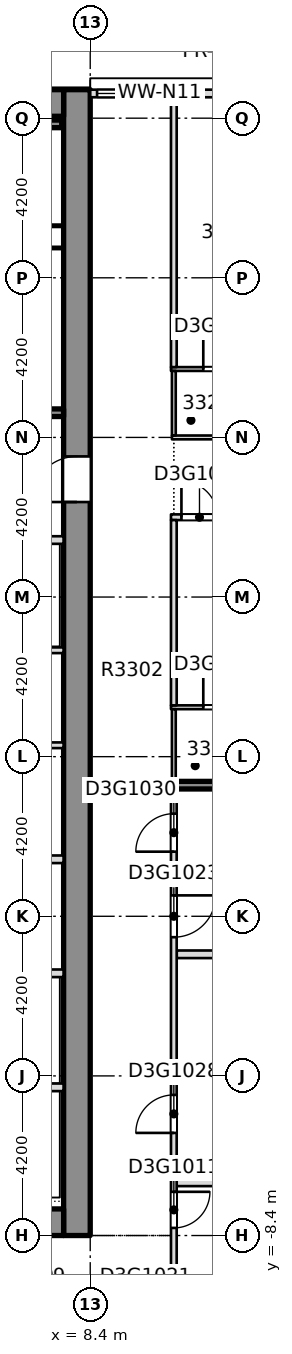
"""IFC4 building model, lengths in metres.
Left out: names, types, materials, properties, quantities, classifications, styles, units other than length and angle.
Written with IfcOpenShell. Run it as: python <this file> out.ifc"""

import sys

from ifc_helpers import new_model, si_unit, direction, frame, frame_2d, origin, place, context, subcontext, project, spatial, rectangle, extrude, element, fill, save


model = new_model("IFC4")
c1 = context("Model", 3, precision=1e-05, world=origin(), true_north=direction((0.0, 1.0)))
c2 = subcontext(c1, "Body", "Model", "MODEL_VIEW")
j1 = project(units=[si_unit("LENGTHUNIT", "METRE"), si_unit("PLANEANGLEUNIT", "RADIAN")], contexts=[c1])
p1 = place(None, origin())
s1 = spatial("IfcSite", under=j1, at=p1, CompositionType="ELEMENT")
p2 = place(p1, origin())
s2 = spatial("IfcBuilding", under=s1, at=p2, CompositionType="ELEMENT")
p3 = place(p2, frame((0.0, 0.0, 133.1)))
s3 = spatial("IfcBuildingStorey", under=s2, at=p3, CompositionType="ELEMENT", Elevation=133.1)
p4 = place(p3, frame((8.05, -8.4, -0.4), z_axis=(0.0, 0.0, 1.0), x_axis=(0.0, 1.0, 0.0)))
e1 = element("IfcWall", 1, at=p4, inside=s3, PredefinedType="SOLIDWALL", context=c2, shape_type="SweptSolid", body=[
    extrude(rectangle(XDim=30.15, YDim=0.7, at=frame_2d((15.075, 0.0))), origin(), (0.0, 0.0, 1.0), 3.45),
])
p5 = place(p4, frame((19.3, 0.0, 0.4)))
e2 = element("IfcOpeningElement", 2, at=p5, cuts=e1, PredefinedType="OPENING", context=c2, shape_type="SweptSolid", body=[
    extrude(rectangle(XDim=1.2, YDim=2.1, at=frame_2d((0.6, 1.05))), frame((0.0, 0.36, 0.0), z_axis=(0.0, -1.0, 0.0), x_axis=(1.0, 0.0, 0.0)), (0.0, 0.0, 1.0), 0.72),
])
p6 = place(p3, frame((-7.7, -8.05, -0.4), z_axis=(0.0, 0.0, 1.0), x_axis=(1.0, 0.0, 0.0)))
e3 = element("IfcWall", 3, at=p6, inside=s3, PredefinedType="SHEAR", context=c2, shape_type="SweptSolid", body=[
    extrude(rectangle(XDim=15.4, YDim=0.7, at=frame_2d((7.7, 0.0))), origin(), (0.0, 0.0, 1.0), 3.45),
])
p7 = place(p6, frame((2.95, 0.0, 0.4)))
e4 = element("IfcOpeningElement", 4, at=p7, cuts=e3, PredefinedType="OPENING", context=c2, shape_type="SweptSolid", body=[
    extrude(rectangle(XDim=1.8, YDim=2.1, at=frame_2d((0.9, 1.05))), frame((0.0, 0.36, 0.0), z_axis=(0.0, -1.0, 0.0), x_axis=(1.0, 0.0, 0.0)), (0.0, 0.0, 1.0), 0.72),
])
p8 = place(p6, frame((10.65, 0.0, 0.4)))
e5 = element("IfcOpeningElement", 5, at=p8, cuts=e3, PredefinedType="OPENING", context=c2, shape_type="SweptSolid", body=[
    extrude(rectangle(XDim=1.8, YDim=2.1, at=frame_2d((0.9, 1.05))), frame((0.0, 0.36, 0.0), z_axis=(0.0, -1.0, 0.0), x_axis=(1.0, 0.0, 0.0)), (0.0, 0.0, 1.0), 0.72),
])
p9 = place(p3, frame((-7.7, 21.4, -0.4), z_axis=(0.0, 0.0, 1.0), x_axis=(1.0, 0.0, 0.0)))
e6 = element("IfcWall", 6, at=p9, inside=s3, PredefinedType="SHEAR", context=c2, shape_type="SweptSolid", body=[
    extrude(rectangle(XDim=15.4, YDim=0.7, at=frame_2d((7.7, 0.0))), origin(), (0.0, 0.0, 1.0), 3.45),
])
p10 = place(p3, frame((10.675, -7.0, 0.0), z_axis=(0.0, 0.0, 1.0), x_axis=(1.0, 0.0, 0.0)))
e7 = element("IfcWall", 7, at=p10, inside=s3, PredefinedType="PARTITIONING", context=c2, shape_type="SweptSolid", body=[
    extrude(rectangle(XDim=10.875, YDim=0.2, at=frame_2d((5.438, 0.0))), origin(), (0.0, 0.0, 1.0), 3.05),
])
p11 = place(p3, frame((10.677, -1.0, 0.0), z_axis=(0.0, 0.0, 1.0), x_axis=(1.0, 0.0, 0.0)))
e8 = element("IfcWall", 8, at=p11, inside=s3, PredefinedType="PARTITIONING", context=c2, shape_type="SweptSolid", body=[
    extrude(rectangle(XDim=6.071, YDim=0.2, at=frame_2d((3.036, 0.0))), origin(), (0.0, 0.0, 1.0), 3.05),
])
p12 = place(p3, frame((10.675, 1.0, 0.0), z_axis=(0.0, 0.0, 1.0), x_axis=(1.0, 0.0, 0.0)))
e9 = element("IfcWall", 9, at=p12, inside=s3, PredefinedType="PARTITIONING", context=c2, shape_type="SweptSolid", body=[
    extrude(rectangle(XDim=6.075, YDim=0.2, at=frame_2d((3.038, 0.0))), origin(), (0.0, 0.0, 1.0), 3.05),
])
p13 = place(p3, frame((10.525, 3.45, 0.0), z_axis=(0.0, 0.0, 1.0), x_axis=(1.0, 0.0, 0.0)))
e10 = element("IfcWall", 10, at=p13, inside=s3, PredefinedType="SOLIDWALL", context=c2, shape_type="SweptSolid", body=[
    extrude(rectangle(XDim=2.525, YDim=0.2, at=frame_2d((1.263, 0.0))), origin(), (0.0, 0.0, 1.0), 3.05),
])
p14 = place(p3, frame((10.525, 5.5, 0.0), z_axis=(0.0, 0.0, 1.0), x_axis=(1.0, 0.0, 0.0)))
e11 = element("IfcWall", 11, at=p14, inside=s3, PredefinedType="PARTITIONING", context=c2, shape_type="SweptSolid", body=[
    extrude(rectangle(XDim=2.525, YDim=0.1, at=frame_2d((1.263, 0.0))), origin(), (0.0, 0.0, 1.0), 3.05),
])
p15 = place(p14, frame((0.85, 0.0, 0.0)))
e12 = element("IfcOpeningElement", 12, at=p15, cuts=e11, PredefinedType="OPENING", context=c2, shape_type="SweptSolid", body=[
    extrude(rectangle(XDim=0.85, YDim=2.1, at=frame_2d((0.425, 1.05))), frame((0.0, 0.06, 0.0), z_axis=(0.0, -1.0, 0.0), x_axis=(1.0, 0.0, 0.0)), (0.0, 0.0, 1.0), 0.12),
])
p16 = place(p3, frame((10.525, 10.5, 0.0), z_axis=(0.0, 0.0, 1.0), x_axis=(1.0, 0.0, 0.0)))
e13 = element("IfcWall", 13, at=p16, inside=s3, PredefinedType="PARTITIONING", context=c2, shape_type="SweptSolid", body=[
    extrude(rectangle(XDim=11.025, YDim=0.15, at=frame_2d((5.513, 0.0))), origin(), (0.0, 0.0, 1.0), 3.05),
])
p17 = place(p16, frame((0.275, 0.0, 0.0)))
e14 = element("IfcOpeningElement", 14, at=p17, cuts=e13, PredefinedType="OPENING", context=c2, shape_type="SweptSolid", body=[
    extrude(rectangle(XDim=0.95, YDim=2.1, at=frame_2d((0.475, 1.05))), frame((0.0, 0.085, 0.0), z_axis=(0.0, -1.0, 0.0), x_axis=(1.0, 0.0, 0.0)), (0.0, 0.0, 1.0), 0.17),
])
p18 = place(p3, frame((10.55, 12.6, 0.0), z_axis=(0.0, 0.0, 1.0), x_axis=(1.0, 0.0, 0.0)))
e15 = element("IfcWall", 15, at=p18, inside=s3, PredefinedType="PARTITIONING", context=c2, shape_type="SweptSolid", body=[
    extrude(rectangle(XDim=2.5, YDim=0.1, at=frame_2d((1.25, 0.0))), origin(), (0.0, 0.0, 1.0), 3.05),
])
p19 = place(p3, frame((10.525, 14.4, 0.0), z_axis=(0.0, 0.0, 1.0), x_axis=(1.0, 0.0, 0.0)))
e16 = element("IfcWall", 16, at=p19, inside=s3, PredefinedType="PARTITIONING", context=c2, shape_type="SweptSolid", body=[
    extrude(rectangle(XDim=2.525, YDim=0.1, at=frame_2d((1.263, 0.0))), origin(), (0.0, 0.0, 1.0), 3.05),
])
p20 = place(p19, frame((0.85, 0.0, 0.0)))
e17 = element("IfcOpeningElement", 17, at=p20, cuts=e16, PredefinedType="OPENING", context=c2, shape_type="SweptSolid", body=[
    extrude(rectangle(XDim=0.85, YDim=2.1, at=frame_2d((0.425, 1.05))), frame((0.0, 0.06, 0.0), z_axis=(0.0, -1.0, 0.0), x_axis=(1.0, 0.0, 0.0)), (0.0, 0.0, 1.0), 0.12),
])
p21 = place(p3, frame((10.6, -10.29, 0.0), z_axis=(0.0, 0.0, 1.0), x_axis=(0.0, 1.0, 0.0)))
e18 = element("IfcWall", 18, at=p21, inside=s3, PredefinedType="PARTITIONING", context=c2, shape_type="SweptSolid", body=[
    extrude(rectangle(XDim=13.64, YDim=0.15, at=frame_2d((6.82, 0.0))), origin(), (0.0, 0.0, 1.0), 3.05),
])
p22 = place(p21, frame((2.09, 0.0, 0.0)))
e19 = element("IfcOpeningElement", 19, at=p22, cuts=e18, PredefinedType="OPENING", context=c2, shape_type="SweptSolid", body=[
    extrude(rectangle(XDim=0.95, YDim=2.1, at=frame_2d((0.475, 1.05))), frame((0.0, 0.085, 0.0), z_axis=(0.0, -1.0, 0.0), x_axis=(1.0, 0.0, 0.0)), (0.0, 0.0, 1.0), 0.17),
])
p23 = place(p21, frame((9.74, 0.0, 0.0)))
e20 = element("IfcOpeningElement", 20, at=p23, cuts=e18, PredefinedType="OPENING", context=c2, shape_type="SweptSolid", body=[
    extrude(rectangle(XDim=1.1, YDim=2.1, at=frame_2d((0.55, 1.05))), frame((0.0, 0.085, 0.0), z_axis=(0.0, -1.0, 0.0), x_axis=(1.0, 0.0, 0.0)), (0.0, 0.0, 1.0), 0.17),
])
p24 = place(p21, frame((4.59, 0.0, 0.0)))
e21 = element("IfcOpeningElement", 21, at=p24, cuts=e18, PredefinedType="OPENING", context=c2, shape_type="SweptSolid", body=[
    extrude(rectangle(XDim=1.0, YDim=2.1, at=frame_2d((0.5, 1.05))), frame((0.0, 0.085, 0.0), z_axis=(0.0, -1.0, 0.0), x_axis=(1.0, 0.0, 0.0)), (0.0, 0.0, 1.0), 0.17),
])
p25 = place(p21, frame((11.99, 0.0, 0.0)))
e22 = element("IfcOpeningElement", 22, at=p25, cuts=e18, PredefinedType="OPENING", context=c2, shape_type="SweptSolid", body=[
    extrude(rectangle(XDim=1.0, YDim=2.1, at=frame_2d((0.5, 1.05))), frame((0.0, 0.085, 0.0), z_axis=(0.0, -1.0, 0.0), x_axis=(1.0, 0.0, 0.0)), (0.0, 0.0, 1.0), 0.17),
])
p26 = place(p3, frame((10.6, 3.45, 0.0), z_axis=(0.0, 0.0, 1.0), x_axis=(0.0, 1.0, 0.0)))
e23 = element("IfcWall", 23, at=p26, inside=s3, PredefinedType="PARTITIONING", context=c2, shape_type="SweptSolid", body=[
    extrude(rectangle(XDim=2.0, YDim=0.1, at=frame_2d((1.0, 0.0))), origin(), (0.0, 0.0, 1.0), 3.05),
])
p27 = place(p3, frame((10.6, 5.55, 0.0), z_axis=(0.0, 0.0, 1.0), x_axis=(0.0, 1.0, 0.0)))
e24 = element("IfcWall", 24, at=p27, inside=s3, PredefinedType="PARTITIONING", context=c2, shape_type="SweptSolid", body=[
    extrude(rectangle(XDim=4.875, YDim=0.15, at=frame_2d((2.438, 0.0))), origin(), (0.0, 0.0, 1.0), 3.05),
])
p28 = place(p3, frame((10.6, 12.65, 0.0), z_axis=(0.0, 0.0, 1.0), x_axis=(0.0, 1.0, 0.0)))
e25 = element("IfcWall", 25, at=p28, inside=s3, PredefinedType="PARTITIONING", context=c2, shape_type="SweptSolid", body=[
    extrude(rectangle(XDim=1.7, YDim=0.1, at=frame_2d((0.85, 0.0))), origin(), (0.0, 0.0, 1.0), 3.05),
])
p29 = place(p3, frame((10.6, 14.45, 0.0), z_axis=(0.0, 0.0, 1.0), x_axis=(0.0, 1.0, 0.0)))
e26 = element("IfcWall", 26, at=p29, inside=s3, PredefinedType="PARTITIONING", context=c2, shape_type="SweptSolid", body=[
    extrude(rectangle(XDim=7.1, YDim=0.15, at=frame_2d((3.55, 0.0))), origin(), (0.0, 0.0, 1.0), 3.05),
])
p30 = place(p3, frame((12.05, 21.65, 0.0), z_axis=(0.0, 0.0, 1.0), x_axis=(-1.0, 0.0, 0.0)))
e27 = element("IfcWall", 27, at=p30, inside=s3, PredefinedType="STANDARD", context=c2, shape_type="SweptSolid", body=[
    extrude(rectangle(XDim=3.65, YDim=0.2, at=frame_2d((1.825, 0.0))), origin(), (0.0, 0.0, 1.0), 3.05),
])
p31 = place(p30, frame((1.67, 0.0, 0.2)))
e28 = element("IfcOpeningElement", 28, at=p31, cuts=e27, PredefinedType="OPENING", context=c2, shape_type="SweptSolid", body=[
    extrude(rectangle(XDim=1.8, YDim=2.65, at=frame_2d((0.9, 1.325))), frame((0.0, 0.11, 0.0), z_axis=(0.0, -1.0, 0.0), x_axis=(1.0, 0.0, 0.0)), (0.0, 0.0, 1.0), 0.22),
])
for number, where, z_axis, x_axis in (
    (29, (5.575, -4.5, 0.0), (0.0, 0.0, 1.0), (1.0, 0.0, 0.0)),
    (30, (5.575, -1.5, 0.0), (0.0, 0.0, 1.0), (1.0, 0.0, 0.0)),
    (31, (5.575, 1.5, 0.0), (0.0, 0.0, 1.0), (1.0, 0.0, 0.0)),
):
    element("IfcWall", number, at=place(p3, frame(where, z_axis=z_axis, x_axis=x_axis)), inside=s3, PredefinedType="PARTITIONING", context=c2, shape_type="SweptSolid", body=[
        extrude(rectangle(XDim=2.124, YDim=0.2, at=frame_2d((1.062, 0.0))), origin(), (0.0, 0.0, 1.0), 3.05),
    ])
p32 = place(p3, frame((5.425, 4.5, 0.0), z_axis=(0.0, 0.0, 1.0), x_axis=(1.0, 0.0, 0.0)))
e32 = element("IfcWall", 32, at=p32, inside=s3, PredefinedType="PARTITIONING", context=c2, shape_type="SweptSolid", body=[
    extrude(rectangle(XDim=2.274, YDim=0.15, at=frame_2d((1.137, 0.0))), origin(), (0.0, 0.0, 1.0), 3.05),
])
p33 = place(p3, frame((-7.699, 7.0, 0.0), z_axis=(0.0, 0.0, 1.0), x_axis=(1.0, 0.0, 0.0)))
e33 = element("IfcWall", 33, at=p33, inside=s3, PredefinedType="PARTITIONING", context=c2, shape_type="SweptSolid", body=[
    extrude(rectangle(XDim=15.398, YDim=0.15, at=frame_2d((7.699, 0.0))), origin(), (0.0, 0.0, 1.0), 3.05),
])
p34 = place(p33, frame((6.999, 0.0, 0.0)))
e34 = element("IfcOpeningElement", 34, at=p34, cuts=e33, PredefinedType="OPENING", context=c2, shape_type="SweptSolid", body=[
    extrude(rectangle(XDim=1.4, YDim=2.1, at=frame_2d((0.7, 1.05))), frame((0.0, 0.085, 0.0), z_axis=(0.0, -1.0, 0.0), x_axis=(1.0, 0.0, 0.0)), (0.0, 0.0, 1.0), 0.17),
])
p35 = place(p3, frame((3.6, 9.9, 0.0), z_axis=(0.0, 0.0, 1.0), x_axis=(1.0, 0.0, 0.0)))
e35 = element("IfcWall", 35, at=p35, inside=s3, PredefinedType="PARTITIONING", context=c2, shape_type="SweptSolid", body=[
    extrude(rectangle(XDim=4.099, YDim=0.2, at=frame_2d((2.049, 0.0))), origin(), (0.0, 0.0, 1.0), 3.05),
])
p36 = place(p35, frame((2.25, 0.0, 0.0)))
e36 = element("IfcOpeningElement", 36, at=p36, cuts=e35, PredefinedType="OPENING", context=c2, shape_type="SweptSolid", body=[
    extrude(rectangle(XDim=1.1, YDim=2.1, at=frame_2d((0.55, 1.05))), frame((0.0, 0.11, 0.0), z_axis=(0.0, -1.0, 0.0), x_axis=(1.0, 0.0, 0.0)), (0.0, 0.0, 1.0), 0.22),
])
p37 = place(p3, frame((3.425, 13.25, 0.0), z_axis=(0.0, 0.0, 1.0), x_axis=(1.0, 0.0, 0.0)))
e37 = element("IfcWall", 37, at=p37, inside=s3, PredefinedType="SOLIDWALL", context=c2, shape_type="SweptSolid", body=[
    extrude(rectangle(XDim=4.274, YDim=0.2, at=frame_2d((2.137, 0.0))), origin(), (0.0, 0.0, 1.0), 3.05),
])
p38 = place(p37, frame((1.825, 0.0, 0.0)))
e38 = element("IfcOpeningElement", 38, at=p38, cuts=e37, PredefinedType="OPENING", context=c2, shape_type="SweptSolid", body=[
    extrude(rectangle(XDim=1.2, YDim=2.1, at=frame_2d((0.6, 1.05))), frame((0.0, 0.11, 0.0), z_axis=(0.0, -1.0, 0.0), x_axis=(1.0, 0.0, 0.0)), (0.0, 0.0, 1.0), 0.22),
])
p39 = place(p3, frame((4.1, 20.85, 0.0), z_axis=(0.0, 0.0, 1.0), x_axis=(1.0, 0.0, 0.0)))
e39 = element("IfcWall", 39, at=p39, inside=s3, PredefinedType="SOLIDWALL", context=c2, shape_type="SweptSolid", body=[
    extrude(rectangle(XDim=3.55, YDim=0.2, at=frame_2d((1.775, 0.0))), origin(), (0.0, 0.0, 1.0), 3.05),
])
p40 = place(p22, origin())
e40 = element("IfcDoor", 40, at=p40, inside=s3, OperationType="SINGLE_SWING_LEFT", PredefinedType="DOOR", context=c2, shape_type="SweptSolid", body=[
    extrude(rectangle(XDim=0.95, YDim=2.1, at=frame_2d((0.475, 1.05))), frame((0.0, 0.025, 0.0), z_axis=(0.0, -1.0, 0.0), x_axis=(1.0, 0.0, 0.0)), (0.0, 0.0, 1.0), 0.05),
])
fill(e19, e40)
p41 = place(p17, origin())
e41 = element("IfcDoor", 41, at=p41, inside=s3, OperationType="SINGLE_SWING_RIGHT", PredefinedType="DOOR", context=c2, shape_type="SweptSolid", body=[
    extrude(rectangle(XDim=0.95, YDim=2.1, at=frame_2d((0.475, 1.05))), frame((0.0, 0.025, 0.0), z_axis=(0.0, -1.0, 0.0), x_axis=(1.0, 0.0, 0.0)), (0.0, 0.0, 1.0), 0.05),
])
fill(e14, e41)
p42 = place(p15, origin())
e42 = element("IfcDoor", 42, at=p42, inside=s3, OperationType="SINGLE_SWING_RIGHT", PredefinedType="DOOR", context=c2, shape_type="SweptSolid", body=[
    extrude(rectangle(XDim=0.85, YDim=2.1, at=frame_2d((0.425, 1.05))), frame((0.0, 0.025, 0.0), z_axis=(0.0, -1.0, 0.0), x_axis=(1.0, 0.0, 0.0)), (0.0, 0.0, 1.0), 0.05),
])
fill(e12, e42)
p43 = place(p20, origin())
e43 = element("IfcDoor", 43, at=p43, inside=s3, OperationType="SINGLE_SWING_RIGHT", PredefinedType="DOOR", context=c2, shape_type="SweptSolid", body=[
    extrude(rectangle(XDim=0.85, YDim=2.1, at=frame_2d((0.425, 1.05))), frame((0.0, 0.025, 0.0), z_axis=(0.0, -1.0, 0.0), x_axis=(1.0, 0.0, 0.0)), (0.0, 0.0, 1.0), 0.05),
])
fill(e17, e43)
p44 = place(p23, origin())
e44 = element("IfcDoor", 44, at=p44, inside=s3, OperationType="SINGLE_SWING_LEFT", PredefinedType="DOOR", context=c2, shape_type="SweptSolid", body=[
    extrude(rectangle(XDim=1.1, YDim=2.1, at=frame_2d((0.55, 1.05))), frame((0.0, 0.025, 0.0), z_axis=(0.0, -1.0, 0.0), x_axis=(1.0, 0.0, 0.0)), (0.0, 0.0, 1.0), 0.05),
])
fill(e20, e44)
p45 = place(p24, origin())
e45 = element("IfcDoor", 45, at=p45, inside=s3, OperationType="SINGLE_SWING_RIGHT", PredefinedType="DOOR", context=c2, shape_type="SweptSolid", body=[
    extrude(rectangle(XDim=1.0, YDim=2.1, at=frame_2d((0.5, 1.05))), frame((0.0, 0.025, 0.0), z_axis=(0.0, -1.0, 0.0), x_axis=(1.0, 0.0, 0.0)), (0.0, 0.0, 1.0), 0.05),
])
fill(e21, e45)
p46 = place(p25, origin())
e46 = element("IfcDoor", 46, at=p46, inside=s3, OperationType="SINGLE_SWING_LEFT", PredefinedType="DOOR", context=c2, shape_type="SweptSolid", body=[
    extrude(rectangle(XDim=1.0, YDim=2.1, at=frame_2d((0.5, 1.05))), frame((0.0, 0.025, 0.0), z_axis=(0.0, -1.0, 0.0), x_axis=(1.0, 0.0, 0.0)), (0.0, 0.0, 1.0), 0.05),
])
fill(e22, e46)
p47 = place(p31, origin())
e47 = element("IfcWindow", 47, at=p47, inside=s3, PartitioningType="SINGLE_PANEL", PredefinedType="WINDOW", context=c2, shape_type="SweptSolid", body=[
    extrude(rectangle(XDim=1.8, YDim=2.65, at=frame_2d((0.9, 1.325))), frame((0.0, 0.03, 0.0), z_axis=(0.0, -1.0, 0.0), x_axis=(1.0, 0.0, 0.0)), (0.0, 0.0, 1.0), 0.06),
])
fill(e28, e47)
p48 = place(p5, origin())
e48 = element("IfcDoor", 48, at=p48, inside=s3, OperationType="SINGLE_SWING_LEFT", PredefinedType="DOOR", context=c2, shape_type="SweptSolid", body=[
    extrude(rectangle(XDim=1.2, YDim=2.1, at=frame_2d((0.6, 1.05))), frame((0.0, 0.025, 0.0), z_axis=(0.0, -1.0, 0.0), x_axis=(1.0, 0.0, 0.0)), (0.0, 0.0, 1.0), 0.05),
])
fill(e2, e48)
save(model, sys.argv[1])
